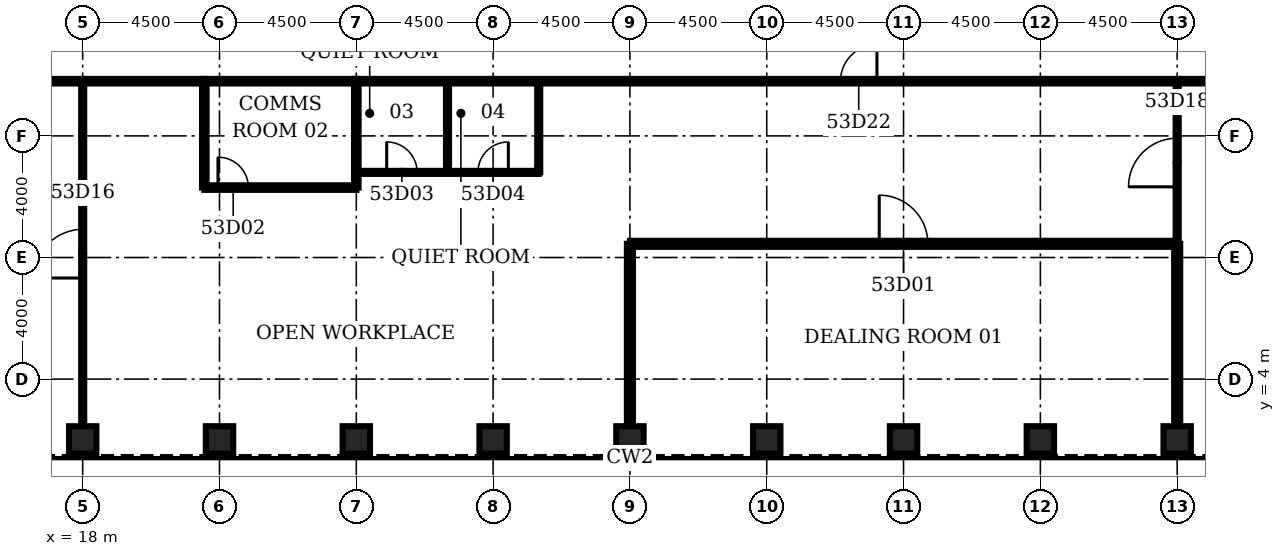
"""IFC4 building model, lengths in metres.
Left out: names, types, materials, properties, quantities, classifications, styles, units other than length and angle.
Written with IfcOpenShell. Run it as: python <this file> out.ifc"""

import sys

from ifc_helpers import new_model, si_unit, direction, frame, frame_2d, origin, origin_2d, place, context, subcontext, project, spatial, rectangle, hollow_rectangle, extrude, element, fill, save


model = new_model("IFC4")
c1 = context("Model", 3, precision=1e-05, world=origin(), true_north=direction((0.0, 1.0)))
c2 = subcontext(c1, "Body", "Model", "MODEL_VIEW")
j1 = project(units=[si_unit("LENGTHUNIT", "METRE"), si_unit("PLANEANGLEUNIT", "RADIAN")], contexts=[c1])
p1 = place(None, origin())
s1 = spatial("IfcSite", under=j1, at=p1, CompositionType="ELEMENT")
p2 = place(p1, origin())
s2 = spatial("IfcBuilding", under=s1, at=p2, CompositionType="ELEMENT")
p3 = place(p2, frame((0.0, 0.0, 236.2)))
s3 = spatial("IfcBuildingStorey", under=s2, at=p3, CompositionType="ELEMENT", Elevation=236.2)
for number, where, z_axis, x_axis in (
    (1, (18.0, 2.0, 0.0), (0.0, 0.0, 1.0), (0.0, 1.0, 0.0)),
    (2, (22.5, 2.0, 0.0), (0.0, 0.0, 1.0), (0.0, 1.0, 0.0)),
    (3, (27.0, 2.0, 0.0), (0.0, 0.0, 1.0), (0.0, 1.0, 0.0)),
    (4, (31.5, 2.0, 0.0), (0.0, 0.0, 1.0), (0.0, 1.0, 0.0)),
    (5, (36.0, 2.0, 0.0), (0.0, 0.0, 1.0), (0.0, 1.0, 0.0)),
    (6, (40.5, 2.0, 0.0), (0.0, 0.0, 1.0), (0.0, 1.0, 0.0)),
    (7, (45.0, 2.0, 0.0), (0.0, 0.0, 1.0), (0.0, 1.0, 0.0)),
    (8, (49.5, 2.0, 0.0), (0.0, 0.0, 1.0), (0.0, 1.0, 0.0)),
    (9, (54.0, 2.0, 0.0), (0.0, 0.0, 1.0), (0.0, 1.0, 0.0)),
):
    element("IfcColumn", number, at=place(p3, frame(where, z_axis=z_axis, x_axis=x_axis)), inside=s3, PredefinedType="COLUMN", context=c2, shape_type="SweptSolid", body=[
        extrude(hollow_rectangle(XDim=0.9, YDim=0.9, WallThickness=0.08, at=origin_2d()), origin(), (0.0, 0.0, 1.0), 4.2),
    ])
p4 = place(p3, frame((36.0, 8.45, 0.0), z_axis=(0.0, 0.0, 1.0), x_axis=(1.0, 0.0, 0.0)))
e10 = element("IfcWall", 10, at=p4, inside=s3, PredefinedType="PARTITIONING", context=c2, shape_type="SweptSolid", body=[
    extrude(rectangle(XDim=18.0, YDim=0.2, at=frame_2d((9.0, 0.0))), origin(), (0.0, 0.0, 1.0), 3.0),
])
p5 = place(p4, frame((8.2, 0.0, 0.0)))
e11 = element("IfcOpeningElement", 11, at=p5, cuts=e10, PredefinedType="OPENING", context=c2, shape_type="SweptSolid", body=[
    extrude(rectangle(XDim=1.6, YDim=2.1, at=frame_2d((0.8, 1.05))), frame((0.0, 0.11, 0.0), z_axis=(0.0, -1.0, 0.0), x_axis=(1.0, 0.0, 0.0)), (0.0, 0.0, 1.0), 0.22),
])
p6 = place(p3, frame((22.0, 10.3, 0.0), z_axis=(0.0, 0.0, 1.0), x_axis=(1.0, 0.0, 0.0)))
e12 = element("IfcWall", 12, at=p6, inside=s3, PredefinedType="PARTITIONING", context=c2, shape_type="SweptSolid", body=[
    extrude(rectangle(XDim=5.0, YDim=0.15, at=frame_2d((2.5, 0.0))), origin(), (0.0, 0.0, 1.0), 3.0),
])
p7 = place(p6, frame((0.45, 0.0, 0.0)))
e13 = element("IfcOpeningElement", 13, at=p7, cuts=e12, PredefinedType="OPENING", context=c2, shape_type="SweptSolid", body=[
    extrude(rectangle(XDim=1.0, YDim=2.1, at=frame_2d((0.5, 1.05))), frame((0.0, 0.085, 0.0), z_axis=(0.0, -1.0, 0.0), x_axis=(1.0, 0.0, 0.0)), (0.0, 0.0, 1.0), 0.17),
])
p8 = place(p3, frame((27.0, 10.8, 0.0), z_axis=(0.0, 0.0, 1.0), x_axis=(1.0, 0.0, 0.0)))
e14 = element("IfcWall", 14, at=p8, inside=s3, PredefinedType="PARTITIONING", context=c2, shape_type="SweptSolid", body=[
    extrude(rectangle(XDim=6.0, YDim=0.1, at=frame_2d((3.0, 0.0))), origin(), (0.0, 0.0, 1.0), 3.0),
])
p9 = place(p8, frame((1.0, 0.0, 0.0)))
e15 = element("IfcOpeningElement", 15, at=p9, cuts=e14, PredefinedType="OPENING", context=c2, shape_type="SweptSolid", body=[
    extrude(rectangle(XDim=1.0, YDim=2.1, at=frame_2d((0.5, 1.05))), frame((0.0, 0.06, 0.0), z_axis=(0.0, -1.0, 0.0), x_axis=(1.0, 0.0, 0.0)), (0.0, 0.0, 1.0), 0.12),
])
p10 = place(p8, frame((4.0, 0.0, 0.0)))
e16 = element("IfcOpeningElement", 16, at=p10, cuts=e14, PredefinedType="OPENING", context=c2, shape_type="SweptSolid", body=[
    extrude(rectangle(XDim=1.0, YDim=2.1, at=frame_2d((0.5, 1.05))), frame((0.0, 0.06, 0.0), z_axis=(0.0, -1.0, 0.0), x_axis=(1.0, 0.0, 0.0)), (0.0, 0.0, 1.0), 0.12),
])
p11 = place(p3, frame((15.2, 13.8, 0.0), z_axis=(0.0, 0.0, 1.0), x_axis=(1.0, 0.0, 0.0)))
e17 = element("IfcWall", 17, at=p11, inside=s3, PredefinedType="PARTITIONING", context=c2, shape_type="SweptSolid", body=[
    extrude(rectangle(XDim=6.8, YDim=0.15, at=frame_2d((3.4, 0.0))), origin(), (0.0, 0.0, 1.0), 3.0),
])
p12 = place(p3, frame((22.0, 13.8, 0.0), z_axis=(0.0, 0.0, 1.0), x_axis=(1.0, 0.0, 0.0)))
e18 = element("IfcWall", 18, at=p12, inside=s3, PredefinedType="PARTITIONING", context=c2, shape_type="SweptSolid", body=[
    extrude(rectangle(XDim=5.0, YDim=0.15, at=frame_2d((2.5, 0.0))), origin(), (0.0, 0.0, 1.0), 3.0),
])
p13 = place(p3, frame((27.0, 13.8, 0.0), z_axis=(0.0, 0.0, 1.0), x_axis=(1.0, 0.0, 0.0)))
e19 = element("IfcWall", 19, at=p13, inside=s3, PredefinedType="PARTITIONING", context=c2, shape_type="SweptSolid", body=[
    extrude(rectangle(XDim=29.8, YDim=0.15, at=frame_2d((14.9, 0.0))), origin(), (0.0, 0.0, 1.0), 3.0),
])
p14 = place(p13, frame((15.925, 0.0, 0.0)))
e20 = element("IfcOpeningElement", 20, at=p14, cuts=e19, PredefinedType="OPENING", context=c2, shape_type="SweptSolid", body=[
    extrude(rectangle(XDim=1.2, YDim=2.1, at=frame_2d((0.6, 1.05))), frame((0.0, 0.085, 0.0), z_axis=(0.0, -1.0, 0.0), x_axis=(1.0, 0.0, 0.0)), (0.0, 0.0, 1.0), 0.17),
])
p15 = place(p3, frame((18.0, 2.45, 0.0), z_axis=(0.0, 0.0, 1.0), x_axis=(0.0, 1.0, 0.0)))
e21 = element("IfcWall", 21, at=p15, inside=s3, PredefinedType="PARTITIONING", context=c2, shape_type="SweptSolid", body=[
    extrude(rectangle(XDim=11.35, YDim=0.1, at=frame_2d((5.675, 0.0))), origin(), (0.0, 0.0, 1.0), 3.0),
])
p16 = place(p15, frame((4.875, 0.0, 0.0)))
e22 = element("IfcOpeningElement", 22, at=p16, cuts=e21, PredefinedType="OPENING", context=c2, shape_type="SweptSolid", body=[
    extrude(rectangle(XDim=1.6, YDim=2.1, at=frame_2d((0.8, 1.05))), frame((0.0, 0.06, 0.0), z_axis=(0.0, -1.0, 0.0), x_axis=(1.0, 0.0, 0.0)), (0.0, 0.0, 1.0), 0.12),
])
for number, where, z_axis, x_axis in (
    (23, (22.0, 10.3, 0.0), (0.0, 0.0, 1.0), (0.0, 1.0, 0.0)),
    (24, (27.0, 10.3, 0.0), (0.0, 0.0, 1.0), (0.0, 1.0, 0.0)),
):
    element("IfcWall", number, at=place(p3, frame(where, z_axis=z_axis, x_axis=x_axis)), inside=s3, PredefinedType="PARTITIONING", context=c2, shape_type="SweptSolid", body=[
        extrude(rectangle(XDim=3.5, YDim=0.15, at=frame_2d((1.75, 0.0))), origin(), (0.0, 0.0, 1.0), 3.0),
    ])
for number, where, z_axis, x_axis in (
    (25, (30.0, 10.8, 0.0), (0.0, 0.0, 1.0), (0.0, 1.0, 0.0)),
    (26, (33.0, 10.8, 0.0), (0.0, 0.0, 1.0), (0.0, 1.0, 0.0)),
):
    element("IfcWall", number, at=place(p3, frame(where, z_axis=z_axis, x_axis=x_axis)), inside=s3, PredefinedType="PARTITIONING", context=c2, shape_type="SweptSolid", body=[
        extrude(rectangle(XDim=3.0, YDim=0.1, at=frame_2d((1.5, 0.0))), origin(), (0.0, 0.0, 1.0), 3.0),
    ])
for number, where, z_axis, x_axis in (
    (27, (36.0, 2.45, 0.0), (0.0, 0.0, 1.0), (0.0, 1.0, 0.0)),
    (28, (54.0, 2.45, 0.0), (0.0, 0.0, 1.0), (0.0, 1.0, 0.0)),
):
    element("IfcWall", number, at=place(p3, frame(where, z_axis=z_axis, x_axis=x_axis)), inside=s3, PredefinedType="PARTITIONING", context=c2, shape_type="SweptSolid", body=[
        extrude(rectangle(XDim=6.0, YDim=0.2, at=frame_2d((3.0, 0.0))), origin(), (0.0, 0.0, 1.0), 3.0),
    ])
p17 = place(p3, frame((54.0, 8.45, 0.0), z_axis=(0.0, 0.0, 1.0), x_axis=(0.0, 1.0, 0.0)))
e29 = element("IfcWall", 29, at=p17, inside=s3, PredefinedType="PARTITIONING", context=c2, shape_type="SweptSolid", body=[
    extrude(rectangle(XDim=5.35, YDim=0.1, at=frame_2d((2.675, 0.0))), origin(), (0.0, 0.0, 1.0), 3.0),
])
p18 = place(p17, frame((1.875, 0.0, 0.0)))
e30 = element("IfcOpeningElement", 30, at=p18, cuts=e29, PredefinedType="OPENING", context=c2, shape_type="SweptSolid", body=[
    extrude(rectangle(XDim=1.6, YDim=2.1, at=frame_2d((0.8, 1.05))), frame((0.0, 0.06, 0.0), z_axis=(0.0, -1.0, 0.0), x_axis=(1.0, 0.0, 0.0)), (0.0, 0.0, 1.0), 0.12),
])
p19 = place(p5, origin())
e31 = element("IfcDoor", 31, at=p19, inside=s3, OperationType="SINGLE_SWING_LEFT", PredefinedType="DOOR", context=c2, shape_type="SweptSolid", body=[
    extrude(rectangle(XDim=1.6, YDim=2.1, at=frame_2d((0.8, 1.05))), frame((0.0, 0.025, 0.0), z_axis=(0.0, -1.0, 0.0), x_axis=(1.0, 0.0, 0.0)), (0.0, 0.0, 1.0), 0.05),
])
fill(e11, e31)
p20 = place(p7, origin())
e32 = element("IfcDoor", 32, at=p20, inside=s3, OperationType="SINGLE_SWING_LEFT", PredefinedType="DOOR", context=c2, shape_type="SweptSolid", body=[
    extrude(rectangle(XDim=1.0, YDim=2.1, at=frame_2d((0.5, 1.05))), frame((0.0, 0.025, 0.0), z_axis=(0.0, -1.0, 0.0), x_axis=(1.0, 0.0, 0.0)), (0.0, 0.0, 1.0), 0.05),
])
fill(e13, e32)
p21 = place(p9, origin())
e33 = element("IfcDoor", 33, at=p21, inside=s3, OperationType="SINGLE_SWING_LEFT", PredefinedType="DOOR", context=c2, shape_type="SweptSolid", body=[
    extrude(rectangle(XDim=1.0, YDim=2.1, at=frame_2d((0.5, 1.05))), frame((0.0, 0.025, 0.0), z_axis=(0.0, -1.0, 0.0), x_axis=(1.0, 0.0, 0.0)), (0.0, 0.0, 1.0), 0.05),
])
fill(e15, e33)
p22 = place(p10, origin())
e34 = element("IfcDoor", 34, at=p22, inside=s3, OperationType="SINGLE_SWING_RIGHT", PredefinedType="DOOR", context=c2, shape_type="SweptSolid", body=[
    extrude(rectangle(XDim=1.0, YDim=2.1, at=frame_2d((0.5, 1.05))), frame((0.0, 0.025, 0.0), z_axis=(0.0, -1.0, 0.0), x_axis=(1.0, 0.0, 0.0)), (0.0, 0.0, 1.0), 0.05),
])
fill(e16, e34)
p23 = place(p16, origin())
e35 = element("IfcDoor", 35, at=p23, inside=s3, OperationType="SINGLE_SWING_LEFT", PredefinedType="DOOR", context=c2, shape_type="SweptSolid", body=[
    extrude(rectangle(XDim=1.6, YDim=2.1, at=frame_2d((0.8, 1.05))), frame((0.0, 0.025, 0.0), z_axis=(0.0, -1.0, 0.0), x_axis=(1.0, 0.0, 0.0)), (0.0, 0.0, 1.0), 0.05),
])
fill(e22, e35)
p24 = place(p18, origin())
e36 = element("IfcDoor", 36, at=p24, inside=s3, OperationType="SINGLE_SWING_LEFT", PredefinedType="DOOR", context=c2, shape_type="SweptSolid", body=[
    extrude(rectangle(XDim=1.6, YDim=2.1, at=frame_2d((0.8, 1.05))), frame((0.0, 0.025, 0.0), z_axis=(0.0, -1.0, 0.0), x_axis=(1.0, 0.0, 0.0)), (0.0, 0.0, 1.0), 0.05),
])
fill(e30, e36)
p25 = place(p14, origin())
e37 = element("IfcDoor", 37, at=p25, inside=s3, OperationType="SINGLE_SWING_RIGHT", PredefinedType="DOOR", context=c2, shape_type="SweptSolid", body=[
    extrude(rectangle(XDim=1.2, YDim=2.1, at=frame_2d((0.6, 1.05))), frame((0.0, 0.025, 0.0), z_axis=(0.0, -1.0, 0.0), x_axis=(1.0, 0.0, 0.0)), (0.0, 0.0, 1.0), 0.05),
])
fill(e20, e37)
save(model, sys.argv[1])
